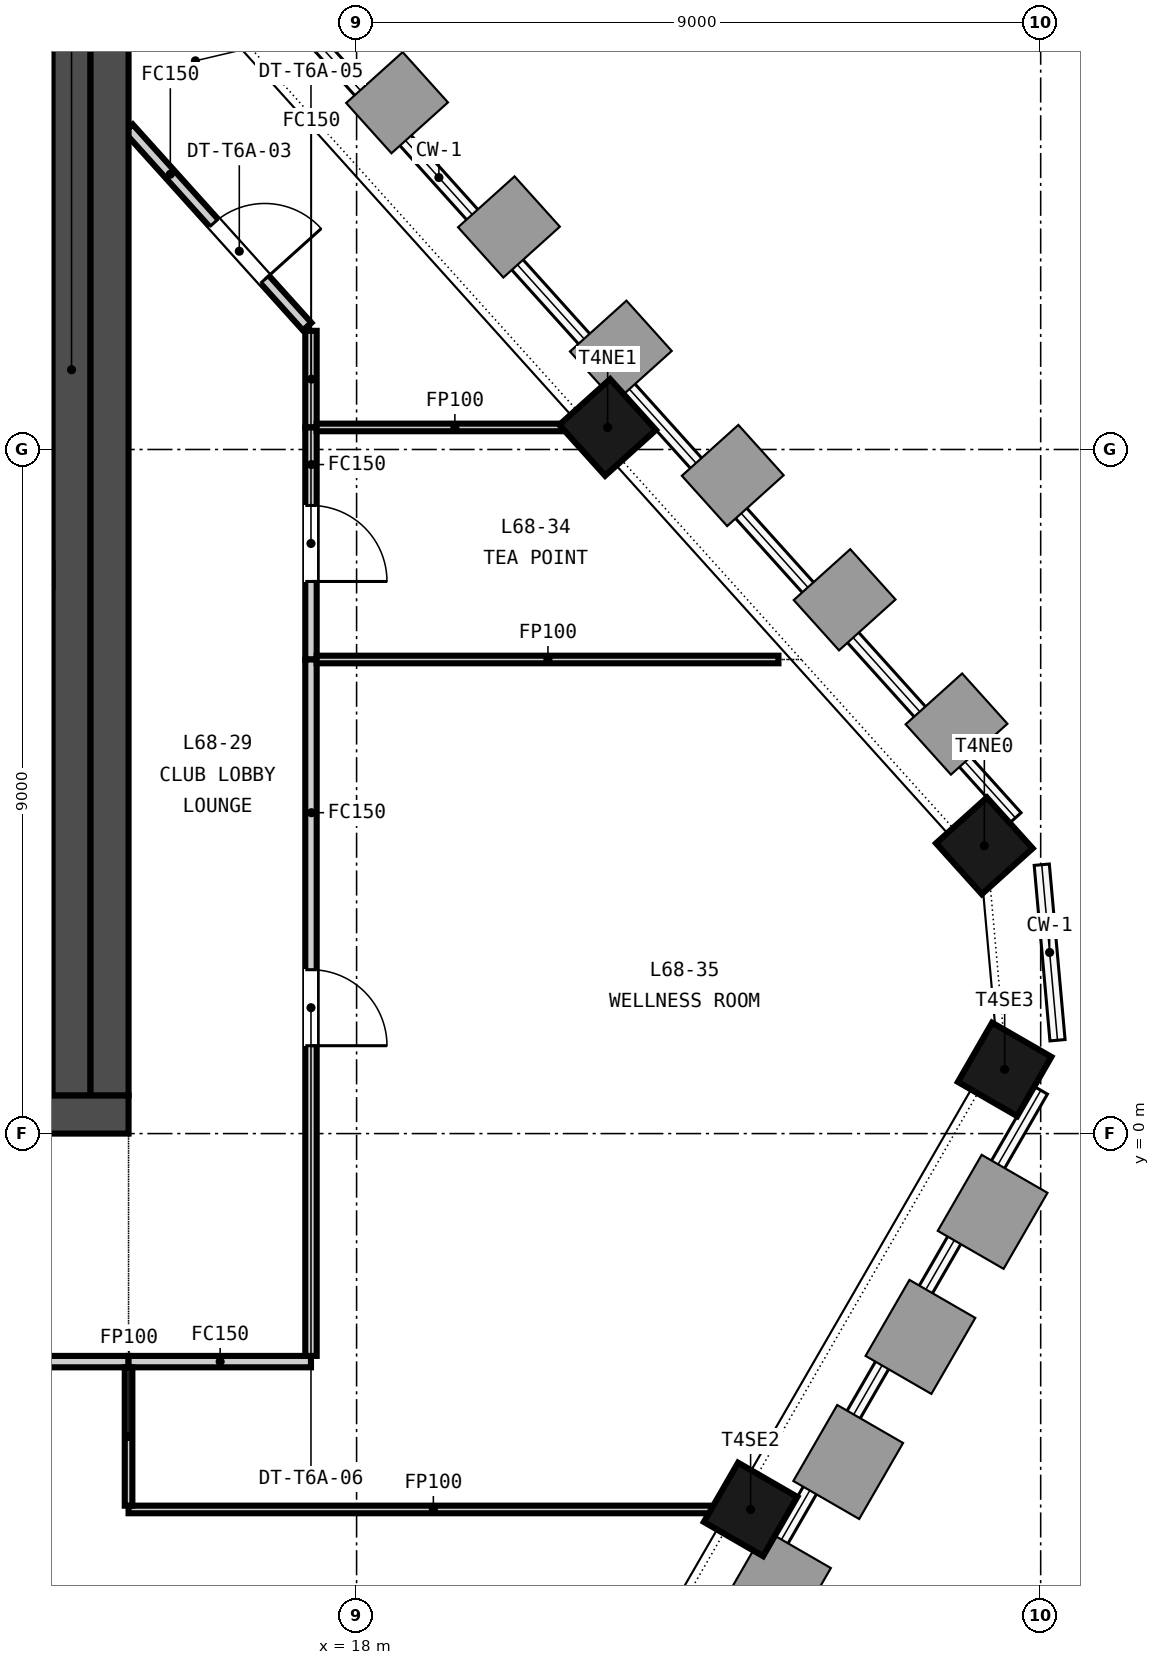
"""IFC4 building model, lengths in metres.
Left out: names, types, materials, properties, quantities, classifications, styles, units other than length and angle.
Written with IfcOpenShell. Run it as: python <this file> out.ifc"""

import sys

from ifc_helpers import new_model, si_unit, direction, frame, frame_2d, origin, origin_2d, place, context, subcontext, project, spatial, rectangle, extrude, element, fill, save


model = new_model("IFC4")
c1 = context("Model", 3, precision=1e-05, world=origin(), true_north=direction((0.0, 1.0)))
c2 = subcontext(c1, "Body", "Model", "MODEL_VIEW")
j1 = project(units=[si_unit("LENGTHUNIT", "METRE"), si_unit("PLANEANGLEUNIT", "RADIAN")], contexts=[c1])
p1 = place(None, origin())
s1 = spatial("IfcSite", under=j1, at=p1, CompositionType="ELEMENT")
p2 = place(p1, origin())
s2 = spatial("IfcBuilding", under=s1, at=p2, CompositionType="ELEMENT")
p3 = place(p2, frame((0.0, 0.0, 268.25)))
s3 = spatial("IfcBuildingStorey", under=s2, at=p3, CompositionType="ELEMENT", Elevation=268.25)
p4 = place(p3, frame((-15.0, 0.25, -0.15), z_axis=(0.0, 0.0, 1.0), x_axis=(1.0, 0.0, 0.0)))
e1 = element("IfcWall", 1, at=p4, inside=s3, PredefinedType="SOLIDWALL", context=c2, shape_type="SweptSolid", body=[
    extrude(rectangle(XDim=30.0, YDim=0.5, at=frame_2d((15.0, 0.0))), origin(), (0.0, 0.0, 1.0), 3.65),
])
p5 = place(p4, frame((5.8, 0.0, 0.15)))
e2 = element("IfcOpeningElement", 2, at=p5, cuts=e1, PredefinedType="OPENING", context=c2, shape_type="SweptSolid", body=[
    extrude(rectangle(XDim=2.4, YDim=2.4, at=frame_2d((1.2, 1.2))), frame((0.0, 0.26, 0.0), z_axis=(0.0, -1.0, 0.0), x_axis=(1.0, 0.0, 0.0)), (0.0, 0.0, 1.0), 0.52),
])
p6 = place(p4, frame((13.8, 0.0, 0.15)))
e3 = element("IfcOpeningElement", 3, at=p6, cuts=e1, PredefinedType="OPENING", context=c2, shape_type="SweptSolid", body=[
    extrude(rectangle(XDim=2.4, YDim=2.4, at=frame_2d((1.2, 1.2))), frame((0.0, 0.26, 0.0), z_axis=(0.0, -1.0, 0.0), x_axis=(1.0, 0.0, 0.0)), (0.0, 0.0, 1.0), 0.52),
])
p7 = place(p4, frame((21.8, 0.0, 0.15)))
e4 = element("IfcOpeningElement", 4, at=p7, cuts=e1, PredefinedType="OPENING", context=c2, shape_type="SweptSolid", body=[
    extrude(rectangle(XDim=2.4, YDim=2.4, at=frame_2d((1.2, 1.2))), frame((0.0, 0.26, 0.0), z_axis=(0.0, -1.0, 0.0), x_axis=(1.0, 0.0, 0.0)), (0.0, 0.0, 1.0), 0.52),
])
p8 = place(p4, frame((1.5, 0.0, 0.15)))
e5 = element("IfcOpeningElement", 5, at=p8, cuts=e1, PredefinedType="OPENING", context=c2, shape_type="SweptSolid", body=[
    extrude(rectangle(XDim=1.2, YDim=2.1, at=frame_2d((0.6, 1.05))), frame((0.0, 0.26, 0.0), z_axis=(0.0, -1.0, 0.0), x_axis=(1.0, 0.0, 0.0)), (0.0, 0.0, 1.0), 0.52),
])
p9 = place(p4, frame((27.3, 0.0, 0.15)))
e6 = element("IfcOpeningElement", 6, at=p9, cuts=e1, PredefinedType="OPENING", context=c2, shape_type="SweptSolid", body=[
    extrude(rectangle(XDim=1.2, YDim=2.1, at=frame_2d((0.6, 1.05))), frame((0.0, 0.26, 0.0), z_axis=(0.0, -1.0, 0.0), x_axis=(1.0, 0.0, 0.0)), (0.0, 0.0, 1.0), 0.52),
])
p10 = place(p3, frame((14.75, 0.5, -0.15), z_axis=(0.0, 0.0, 1.0), x_axis=(0.0, 1.0, 0.0)))
e7 = element("IfcWall", 7, at=p10, inside=s3, PredefinedType="SOLIDWALL", context=c2, shape_type="SweptSolid", body=[
    extrude(rectangle(XDim=14.0, YDim=0.5, at=frame_2d((7.0, 0.0))), origin(), (0.0, 0.0, 1.0), 3.65),
])
for number, where, z_axis, x_axis in (
    (8, (23.184, -4.945, -0.15), (0.0, 0.0, 1.0), (0.5, 0.866, 0.0)),
    (9, (26.526, 0.844, -0.15), (0.0, 0.0, 1.0), (0.5, 0.866, 0.0)),
    (10, (26.259, 3.786, -0.15), (0.0, 0.0, 1.0), (-0.669, 0.743, 0.0)),
    (11, (21.303, 9.29, -0.15), (0.0, 0.0, 1.0), (-0.669, 0.743, 0.0)),
):
    element("IfcColumn", number, at=place(p3, frame(where, z_axis=z_axis, x_axis=x_axis)), inside=s3, PredefinedType="COLUMN", context=c2, shape_type="SweptSolid", body=[
        extrude(rectangle(XDim=0.9, YDim=0.9, at=origin_2d()), origin(), (0.0, 0.0, 1.0), 3.65),
    ])
p11 = place(p3, frame((11.05, 7.35, 0.0), z_axis=(0.0, 0.0, 1.0), x_axis=(1.0, 0.0, 0.0)))
e12 = element("IfcWall", 12, at=p11, inside=s3, PredefinedType="SOLIDWALL", context=c2, shape_type="SweptSolid", body=[
    extrude(rectangle(XDim=2.95, YDim=0.3, at=frame_2d((1.475, 0.0))), origin(), (0.0, 0.0, 1.0), 3.5),
])
p12 = place(p3, frame((14.25, 0.5, 0.0), z_axis=(0.0, 0.0, 1.0), x_axis=(0.0, 1.0, 0.0)))
e13 = element("IfcWall", 13, at=p12, inside=s3, PredefinedType="SOLIDWALL", context=c2, shape_type="SweptSolid", body=[
    extrude(rectangle(XDim=14.0, YDim=0.5, at=frame_2d((7.0, 0.0))), origin(), (0.0, 0.0, 1.0), 3.5),
])
p13 = place(p3, frame((15.0, -3.0, 0.0), z_axis=(0.0, 0.0, 1.0), x_axis=(-1.0, 0.0, 0.0)))
e14 = element("IfcWall", 14, at=p13, inside=s3, PredefinedType="PARTITIONING", context=c2, shape_type="SweptSolid", body=[
    extrude(rectangle(XDim=30.0, YDim=0.15, at=frame_2d((15.0, 0.0))), origin(), (0.0, 0.0, 1.0), 2.751),
])
p14 = place(p13, frame((14.1, 0.0, 0.0)))
e15 = element("IfcOpeningElement", 15, at=p14, cuts=e14, PredefinedType="OPENING", context=c2, shape_type="SweptSolid", body=[
    extrude(rectangle(XDim=1.8, YDim=2.1, at=frame_2d((0.9, 1.05))), frame((0.0, 0.085, 0.0), z_axis=(0.0, -1.0, 0.0), x_axis=(1.0, 0.0, 0.0)), (0.0, 0.0, 1.0), 0.17),
])
p15 = place(p3, frame((17.4, 10.561, 0.0), z_axis=(0.0, 0.0, 1.0), x_axis=(0.0, -1.0, 0.0)))
e16 = element("IfcWall", 16, at=p15, inside=s3, PredefinedType="PARTITIONING", context=c2, shape_type="SweptSolid", body=[
    extrude(rectangle(XDim=1.271, YDim=0.15, at=frame_2d((0.635, 0.0))), origin(), (0.0, 0.0, 1.0), 2.751),
])
p16 = place(p3, frame((17.4, 9.29, 0.0), z_axis=(0.0, 0.0, 1.0), x_axis=(0.0, -1.0, 0.0)))
e17 = element("IfcWall", 17, at=p16, inside=s3, PredefinedType="PARTITIONING", context=c2, shape_type="SweptSolid", body=[
    extrude(rectangle(XDim=3.053, YDim=0.15, at=frame_2d((1.526, 0.0))), origin(), (0.0, 0.0, 1.0), 2.751),
])
p17 = place(p16, frame((1.027, 0.0, 0.0)))
e18 = element("IfcOpeningElement", 18, at=p17, cuts=e17, PredefinedType="OPENING", context=c2, shape_type="SweptSolid", body=[
    extrude(rectangle(XDim=1.0, YDim=2.1, at=frame_2d((0.5, 1.05))), frame((0.0, 0.085, 0.0), z_axis=(0.0, -1.0, 0.0), x_axis=(1.0, 0.0, 0.0)), (0.0, 0.0, 1.0), 0.17),
])
p18 = place(p3, frame((17.4, -3.0, 0.0), z_axis=(0.0, 0.0, 1.0), x_axis=(-1.0, 0.0, 0.0)))
e19 = element("IfcWall", 19, at=p18, inside=s3, PredefinedType="PARTITIONING", context=c2, shape_type="SweptSolid", body=[
    extrude(rectangle(XDim=2.4, YDim=0.15, at=frame_2d((1.2, 0.0))), origin(), (0.0, 0.0, 1.0), 2.751),
])
p19 = place(p3, frame((17.4, 6.237, 0.0), z_axis=(0.0, 0.0, 1.0), x_axis=(0.0, -1.0, 0.0)))
e20 = element("IfcWall", 20, at=p19, inside=s3, PredefinedType="PARTITIONING", context=c2, shape_type="SweptSolid", body=[
    extrude(rectangle(XDim=9.162, YDim=0.15, at=frame_2d((4.581, 0.0))), origin(), (0.0, 0.0, 1.0), 2.751),
])
p20 = place(p19, frame((4.081, 0.0, 0.0)))
e21 = element("IfcOpeningElement", 21, at=p20, cuts=e20, PredefinedType="OPENING", context=c2, shape_type="SweptSolid", body=[
    extrude(rectangle(XDim=1.0, YDim=2.1, at=frame_2d((0.5, 1.05))), frame((0.0, 0.085, 0.0), z_axis=(0.0, -1.0, 0.0), x_axis=(1.0, 0.0, 0.0)), (0.0, 0.0, 1.0), 0.17),
])
p21 = place(p3, frame((15.0, 13.226, 0.0), z_axis=(0.0, 0.0, 1.0), x_axis=(0.669187491984, -0.743093601488, 0.0)))
e22 = element("IfcWall", 22, at=p21, inside=s3, PredefinedType="PARTITIONING", context=c2, shape_type="SweptSolid", body=[
    extrude(rectangle(XDim=3.511, YDim=0.15, at=frame_2d((1.756, 0.0))), origin(), (0.0, 0.0, 1.0), 2.751),
])
p22 = place(p21, frame((1.677, 0.0, 0.0)))
e23 = element("IfcOpeningElement", 23, at=p22, cuts=e22, PredefinedType="OPENING", context=c2, shape_type="SweptSolid", body=[
    extrude(rectangle(XDim=1.0, YDim=2.1, at=frame_2d((0.5, 1.05))), frame((0.0, 0.085, 0.0), z_axis=(0.0, -1.0, 0.0), x_axis=(1.0, 0.0, 0.0)), (0.0, 0.0, 1.0), 0.17),
])
p23 = place(p3, frame((17.475, 9.29, 0.0), z_axis=(0.0, 0.0, 1.0), x_axis=(1.0, 0.0, 0.0)))
e24 = element("IfcWall", 24, at=p23, inside=s3, PredefinedType="PARTITIONING", context=c2, shape_type="SweptSolid", body=[
    extrude(rectangle(XDim=3.626, YDim=0.1, at=frame_2d((1.813, 0.0))), origin(), (0.0, 0.0, 1.0), 2.751),
])
p24 = place(p3, frame((17.475, 6.237, 0.0), z_axis=(0.0, 0.0, 1.0), x_axis=(1.0, 0.0, 0.0)))
e25 = element("IfcWall", 25, at=p24, inside=s3, PredefinedType="PARTITIONING", context=c2, shape_type="SweptSolid", body=[
    extrude(rectangle(XDim=6.075, YDim=0.1, at=frame_2d((3.038, 0.0))), origin(), (0.0, 0.0, 1.0), 2.751),
])
p25 = place(p3, frame((15.0, -4.945, 0.0), z_axis=(0.0, 0.0, 1.0), x_axis=(1.0, 0.0, 0.0)))
e26 = element("IfcWall", 26, at=p25, inside=s3, PredefinedType="PARTITIONING", context=c2, shape_type="SweptSolid", body=[
    extrude(rectangle(XDim=8.01, YDim=0.1, at=frame_2d((4.005, 0.0))), origin(), (0.0, 0.0, 1.0), 2.751),
])
p26 = place(p3, frame((15.0, -4.895, 0.0), z_axis=(0.0, 0.0, 1.0), x_axis=(0.0, 1.0, 0.0)))
e27 = element("IfcWall", 27, at=p26, inside=s3, PredefinedType="PARTITIONING", context=c2, shape_type="SweptSolid", body=[
    extrude(rectangle(XDim=1.82, YDim=0.1, at=frame_2d((0.91, 0.0))), origin(), (0.0, 0.0, 1.0), 2.751),
])
p27 = place(p22, origin())
e28 = element("IfcDoor", 28, at=p27, inside=s3, OperationType="SINGLE_SWING_RIGHT", PredefinedType="DOOR", context=c2, shape_type="SweptSolid", body=[
    extrude(rectangle(XDim=1.0, YDim=2.1, at=frame_2d((0.5, 1.05))), frame((0.0, 0.025, 0.0), z_axis=(0.0, -1.0, 0.0), x_axis=(1.0, 0.0, 0.0)), (0.0, 0.0, 1.0), 0.05),
])
fill(e23, e28)
p28 = place(p17, origin())
e29 = element("IfcDoor", 29, at=p28, inside=s3, OperationType="SINGLE_SWING_RIGHT", PredefinedType="DOOR", context=c2, shape_type="SweptSolid", body=[
    extrude(rectangle(XDim=1.0, YDim=2.1, at=frame_2d((0.5, 1.05))), frame((0.0, 0.025, 0.0), z_axis=(0.0, -1.0, 0.0), x_axis=(1.0, 0.0, 0.0)), (0.0, 0.0, 1.0), 0.05),
])
fill(e18, e29)
p29 = place(p20, origin())
e30 = element("IfcDoor", 30, at=p29, inside=s3, OperationType="SINGLE_SWING_RIGHT", PredefinedType="DOOR", context=c2, shape_type="SweptSolid", body=[
    extrude(rectangle(XDim=1.0, YDim=2.1, at=frame_2d((0.5, 1.05))), frame((0.0, 0.025, 0.0), z_axis=(0.0, -1.0, 0.0), x_axis=(1.0, 0.0, 0.0)), (0.0, 0.0, 1.0), 0.05),
])
fill(e21, e30)
save(model, sys.argv[1])
